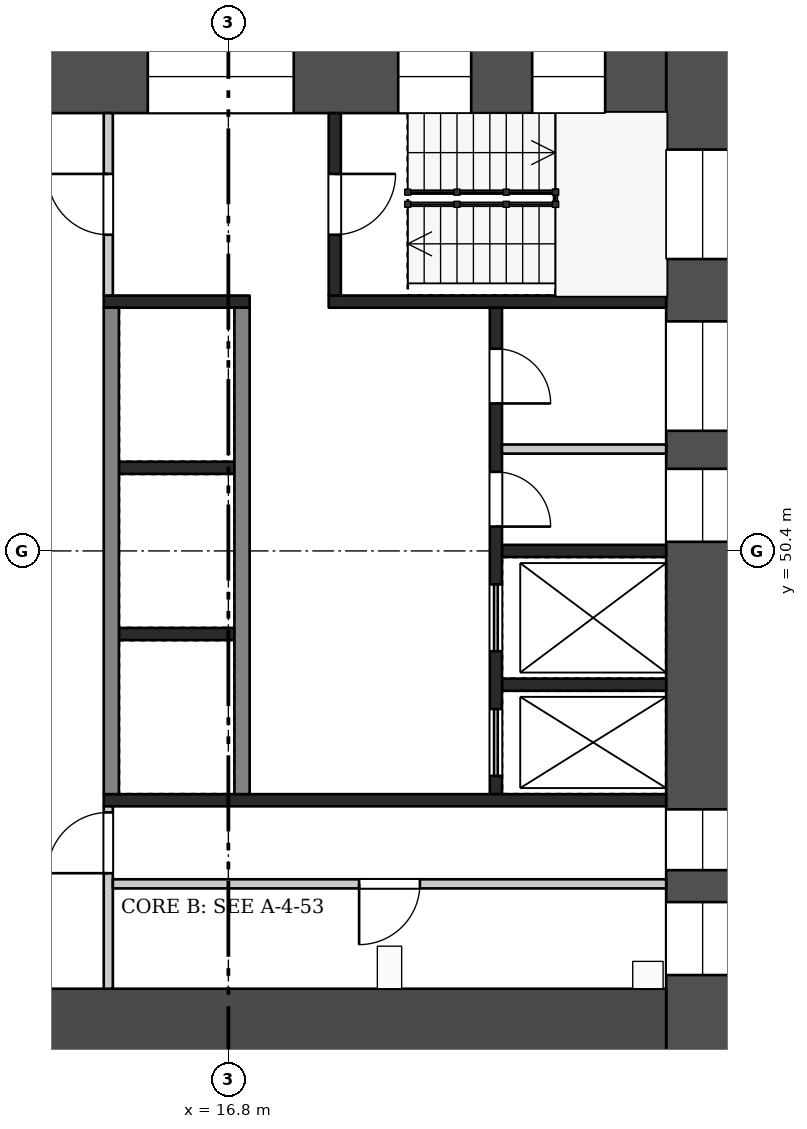
"""IFC4 building model, lengths in metres.
Left out: names, types, materials, properties, quantities, classifications, styles, units other than length and angle.
Written with IfcOpenShell. Run it as: python <this file> out.ifc"""

import sys

from ifc_helpers import new_model, si_unit, direction, frame, frame_2d, origin, place, context, subcontext, project, spatial, rectangle, extrude, element, fill, save


model = new_model("IFC4")
c1 = context("Model", 3, precision=1e-05, world=origin(), true_north=direction((0.0, 1.0)))
c2 = subcontext(c1, "Body", "Model", "MODEL_VIEW")
j1 = project(units=[si_unit("LENGTHUNIT", "METRE"), si_unit("PLANEANGLEUNIT", "RADIAN")], contexts=[c1])
p1 = place(None, origin())
s1 = spatial("IfcSite", under=j1, at=p1, CompositionType="ELEMENT")
p2 = place(p1, origin())
s2 = spatial("IfcBuilding", under=s1, at=p2, CompositionType="ELEMENT")
p3 = place(p2, frame((0.0, 0.0, 102.2)))
s3 = spatial("IfcBuildingStorey", under=s2, at=p3, CompositionType="ELEMENT", Elevation=102.2)
p4 = place(p3, frame((24.6, 58.8, 0.0), z_axis=(0.0, 0.0, 1.0), x_axis=(0.0, -1.0, 0.0)))
e1 = element("IfcWall", 1, at=p4, inside=s3, PredefinedType="SHEAR", context=c2, shape_type="SweptSolid", body=[
    extrude(rectangle(XDim=16.8, YDim=1.2, at=frame_2d((8.4, 0.0))), origin(), (0.0, 0.0, 1.0), 3.22),
])
p5 = place(p4, frame((1.8, 0.0, 0.5)))
e2 = element("IfcOpeningElement", 2, at=p5, cuts=e1, PredefinedType="OPENING", context=c2, shape_type="SweptSolid", body=[
    extrude(rectangle(XDim=1.8, YDim=2.4, at=frame_2d((0.9, 1.2))), frame((0.0, 0.61, 0.0), z_axis=(0.0, -1.0, 0.0), x_axis=(1.0, 0.0, 0.0)), (0.0, 0.0, 1.0), 1.22),
])
p6 = place(p4, frame((4.625, 0.0, 1.6)))
e3 = element("IfcOpeningElement", 3, at=p6, cuts=e1, PredefinedType="OPENING", context=c2, shape_type="SweptSolid", body=[
    extrude(rectangle(XDim=1.8, YDim=1.2, at=frame_2d((0.9, 0.6))), frame((0.0, 0.61, 0.0), z_axis=(0.0, -1.0, 0.0), x_axis=(1.0, 0.0, 0.0)), (0.0, 0.0, 1.0), 1.22),
])
p7 = place(p4, frame((7.05, 0.0, 1.6)))
e4 = element("IfcOpeningElement", 4, at=p7, cuts=e1, PredefinedType="OPENING", context=c2, shape_type="SweptSolid", body=[
    extrude(rectangle(XDim=1.2, YDim=1.2, at=frame_2d((0.6, 0.6))), frame((0.0, 0.61, 0.0), z_axis=(0.0, -1.0, 0.0), x_axis=(1.0, 0.0, 0.0)), (0.0, 0.0, 1.0), 1.22),
])
p8 = place(p4, frame((12.65, 0.0, 0.6)))
e5 = element("IfcOpeningElement", 5, at=p8, cuts=e1, PredefinedType="OPENING", context=c2, shape_type="SweptSolid", body=[
    extrude(rectangle(XDim=1.0, YDim=2.1, at=frame_2d((0.5, 1.05))), frame((0.0, 0.61, 0.0), z_axis=(0.0, -1.0, 0.0), x_axis=(1.0, 0.0, 0.0)), (0.0, 0.0, 1.0), 1.22),
])
p9 = place(p4, frame((14.175, 0.0, 1.6)))
e6 = element("IfcOpeningElement", 6, at=p9, cuts=e1, PredefinedType="OPENING", context=c2, shape_type="SweptSolid", body=[
    extrude(rectangle(XDim=1.2, YDim=1.2, at=frame_2d((0.6, 0.6))), frame((0.0, 0.61, 0.0), z_axis=(0.0, -1.0, 0.0), x_axis=(1.0, 0.0, 0.0)), (0.0, 0.0, 1.0), 1.22),
])
p10 = place(p3, frame((9.6, 58.2, 0.0), z_axis=(0.0, 0.0, 1.0), x_axis=(1.0, 0.0, 0.0)))
e7 = element("IfcWall", 7, at=p10, inside=s3, PredefinedType="SHEAR", context=c2, shape_type="SweptSolid", body=[
    extrude(rectangle(XDim=14.4, YDim=1.2, at=frame_2d((7.2, 0.0))), origin(), (0.0, 0.0, 1.0), 3.22),
])
p11 = place(p10, frame((1.105, 0.0, 0.6)))
e8 = element("IfcOpeningElement", 8, at=p11, cuts=e7, PredefinedType="OPENING", context=c2, shape_type="SweptSolid", body=[
    extrude(rectangle(XDim=3.0, YDim=2.1, at=frame_2d((1.5, 1.05))), frame((0.0, 0.61, 0.0), z_axis=(0.0, -1.0, 0.0), x_axis=(1.0, 0.0, 0.0)), (0.0, 0.0, 1.0), 1.22),
])
p12 = place(p10, frame((5.875, 0.0, 0.6)))
e9 = element("IfcOpeningElement", 9, at=p12, cuts=e7, PredefinedType="OPENING", context=c2, shape_type="SweptSolid", body=[
    extrude(rectangle(XDim=2.4, YDim=2.1, at=frame_2d((1.2, 1.05))), frame((0.0, 0.61, 0.0), z_axis=(0.0, -1.0, 0.0), x_axis=(1.0, 0.0, 0.0)), (0.0, 0.0, 1.0), 1.22),
])
p13 = place(p10, frame((9.993, 0.0, 0.5)))
e10 = element("IfcOpeningElement", 10, at=p13, cuts=e7, PredefinedType="OPENING", context=c2, shape_type="SweptSolid", body=[
    extrude(rectangle(XDim=1.2, YDim=2.4, at=frame_2d((0.6, 1.2))), frame((0.0, 0.61, 0.0), z_axis=(0.0, -1.0, 0.0), x_axis=(1.0, 0.0, 0.0)), (0.0, 0.0, 1.0), 1.22),
])
p14 = place(p10, frame((12.197, 0.0, 0.5)))
e11 = element("IfcOpeningElement", 11, at=p14, cuts=e7, PredefinedType="OPENING", context=c2, shape_type="SweptSolid", body=[
    extrude(rectangle(XDim=1.2, YDim=2.4, at=frame_2d((0.6, 1.2))), frame((0.0, 0.61, 0.0), z_axis=(0.0, -1.0, 0.0), x_axis=(1.0, 0.0, 0.0)), (0.0, 0.0, 1.0), 1.22),
])
p15 = place(p3, frame((9.6, 42.6, 0.0), z_axis=(0.0, 0.0, 1.0), x_axis=(1.0, 0.0, 0.0)))
e12 = element("IfcWall", 12, at=p15, inside=s3, PredefinedType="SHEAR", context=c2, shape_type="SweptSolid", body=[
    extrude(rectangle(XDim=14.4, YDim=1.2, at=frame_2d((7.2, 0.0))), origin(), (0.0, 0.0, 1.0), 3.22),
])
p16 = place(p15, frame((2.1, 0.0, 0.0)))
e13 = element("IfcOpeningElement", 13, at=p16, cuts=e12, PredefinedType="OPENING", context=c2, shape_type="SweptSolid", body=[
    extrude(rectangle(XDim=1.8, YDim=2.1, at=frame_2d((0.9, 1.05))), frame((0.0, 0.61, 0.0), z_axis=(0.0, -1.0, 0.0), x_axis=(1.0, 0.0, 0.0)), (0.0, 0.0, 1.0), 1.22),
])
for number, where, z_axis, x_axis in (
    (14, (15.0, 51.767, 0.0), (0.0, 0.0, 1.0), (1.0, 0.0, 0.0)),
    (15, (15.0, 49.033, 0.0), (0.0, 0.0, 1.0), (1.0, 0.0, 0.0)),
):
    element("IfcWall", number, at=place(p3, frame(where, z_axis=z_axis, x_axis=x_axis)), inside=s3, PredefinedType="SHEAR", context=c2, shape_type="SweptSolid", body=[
        extrude(rectangle(XDim=1.9, YDim=0.2, at=frame_2d((0.95, 0.0))), origin(), (0.0, 0.0, 1.0), 3.22),
    ])
for number, where, z_axis, x_axis in (
    (16, (14.875, 54.4, 0.0), (0.0, 0.0, 1.0), (0.0, -1.0, 0.0)),
    (17, (17.025, 54.4, 0.0), (0.0, 0.0, 1.0), (0.0, -1.0, 0.0)),
):
    element("IfcWall", number, at=place(p3, frame(where, z_axis=z_axis, x_axis=x_axis)), inside=s3, PredefinedType="SHEAR", context=c2, shape_type="SweptSolid", body=[
        extrude(rectangle(XDim=8.0, YDim=0.25, at=frame_2d((4.0, 0.0))), origin(), (0.0, 0.0, 1.0), 3.22),
    ])
for number, where, z_axis, x_axis in (
    (18, (21.3, 50.4, 0.0), (0.0, 0.0, 1.0), (1.0, 0.0, 0.0)),
    (19, (21.3, 48.2, 0.0), (0.0, 0.0, 1.0), (1.0, 0.0, 0.0)),
):
    element("IfcWall", number, at=place(p3, frame(where, z_axis=z_axis, x_axis=x_axis)), inside=s3, PredefinedType="SHEAR", context=c2, shape_type="SweptSolid", body=[
        extrude(rectangle(XDim=2.7, YDim=0.2, at=frame_2d((1.35, 0.0))), origin(), (0.0, 0.0, 1.0), 3.22),
    ])
p17 = place(p3, frame((21.3, 52.075, 0.0), z_axis=(0.0, 0.0, 1.0), x_axis=(1.0, 0.0, 0.0)))
e20 = element("IfcWall", 20, at=p17, inside=s3, PredefinedType="PARTITIONING", context=c2, shape_type="SweptSolid", body=[
    extrude(rectangle(XDim=2.7, YDim=0.15, at=frame_2d((1.35, 0.0))), origin(), (0.0, 0.0, 1.0), 3.22),
])
p18 = place(p3, frame((21.2, 54.4, 0.0), z_axis=(0.0, 0.0, 1.0), x_axis=(0.0, -1.0, 0.0)))
e21 = element("IfcWall", 21, at=p18, inside=s3, PredefinedType="SHEAR", context=c2, shape_type="SweptSolid", body=[
    extrude(rectangle(XDim=8.0, YDim=0.2, at=frame_2d((4.0, 0.0))), origin(), (0.0, 0.0, 1.0), 3.22),
])
p19 = place(p18, frame((0.675, 0.0, 0.0)))
e22 = element("IfcOpeningElement", 22, at=p19, cuts=e21, PredefinedType="OPENING", context=c2, shape_type="SweptSolid", body=[
    extrude(rectangle(XDim=0.9, YDim=2.1, at=frame_2d((0.45, 1.05))), frame((0.0, 0.11, 0.0), z_axis=(0.0, -1.0, 0.0), x_axis=(1.0, 0.0, 0.0)), (0.0, 0.0, 1.0), 0.22),
])
p20 = place(p18, frame((2.7, 0.0, 0.0)))
e23 = element("IfcOpeningElement", 23, at=p20, cuts=e21, PredefinedType="OPENING", context=c2, shape_type="SweptSolid", body=[
    extrude(rectangle(XDim=0.9, YDim=2.1, at=frame_2d((0.45, 1.05))), frame((0.0, 0.11, 0.0), z_axis=(0.0, -1.0, 0.0), x_axis=(1.0, 0.0, 0.0)), (0.0, 0.0, 1.0), 0.22),
])
p21 = place(p18, frame((4.55, 0.0, 0.0)))
e24 = element("IfcOpeningElement", 24, at=p21, cuts=e21, PredefinedType="OPENING", context=c2, shape_type="SweptSolid", body=[
    extrude(rectangle(XDim=1.1, YDim=2.1, at=frame_2d((0.55, 1.05))), frame((0.0, 0.11, 0.0), z_axis=(0.0, -1.0, 0.0), x_axis=(1.0, 0.0, 0.0)), (0.0, 0.0, 1.0), 0.22),
])
p22 = place(p18, frame((6.6, 0.0, 0.0)))
e25 = element("IfcOpeningElement", 25, at=p22, cuts=e21, PredefinedType="OPENING", context=c2, shape_type="SweptSolid", body=[
    extrude(rectangle(XDim=1.1, YDim=2.1, at=frame_2d((0.55, 1.05))), frame((0.0, 0.11, 0.0), z_axis=(0.0, -1.0, 0.0), x_axis=(1.0, 0.0, 0.0)), (0.0, 0.0, 1.0), 0.22),
])
p23 = place(p3, frame((14.75, 54.5, 0.0), z_axis=(0.0, 0.0, 1.0), x_axis=(1.0, 0.0, 0.0)))
e26 = element("IfcWall", 26, at=p23, inside=s3, PredefinedType="SHEAR", context=c2, shape_type="SweptSolid", body=[
    extrude(rectangle(XDim=2.4, YDim=0.2, at=frame_2d((1.2, 0.0))), origin(), (0.0, 0.0, 1.0), 3.22),
])
p24 = place(p3, frame((18.45, 54.5, 0.0), z_axis=(0.0, 0.0, 1.0), x_axis=(1.0, 0.0, 0.0)))
e27 = element("IfcWall", 27, at=p24, inside=s3, PredefinedType="SHEAR", context=c2, shape_type="SweptSolid", body=[
    extrude(rectangle(XDim=5.55, YDim=0.2, at=frame_2d((2.775, 0.0))), origin(), (0.0, 0.0, 1.0), 3.22),
])
p25 = place(p3, frame((14.825, 57.6, 0.0), z_axis=(0.0, 0.0, 1.0), x_axis=(0.0, -1.0, 0.0)))
e28 = element("IfcWall", 28, at=p25, inside=s3, PredefinedType="PARTITIONING", context=c2, shape_type="SweptSolid", body=[
    extrude(rectangle(XDim=3.0, YDim=0.15, at=frame_2d((1.5, 0.0))), origin(), (0.0, 0.0, 1.0), 3.22),
])
p26 = place(p25, frame((1.0, 0.0, 0.0)))
e29 = element("IfcOpeningElement", 29, at=p26, cuts=e28, PredefinedType="OPENING", context=c2, shape_type="SweptSolid", body=[
    extrude(rectangle(XDim=1.0, YDim=2.1, at=frame_2d((0.5, 1.05))), frame((0.0, 0.085, 0.0), z_axis=(0.0, -1.0, 0.0), x_axis=(1.0, 0.0, 0.0)), (0.0, 0.0, 1.0), 0.17),
])
p27 = place(p3, frame((18.55, 57.6, 0.0), z_axis=(0.0, 0.0, 1.0), x_axis=(0.0, -1.0, 0.0)))
e30 = element("IfcWall", 30, at=p27, inside=s3, PredefinedType="SHEAR", context=c2, shape_type="SweptSolid", body=[
    extrude(rectangle(XDim=3.0, YDim=0.2, at=frame_2d((1.5, 0.0))), origin(), (0.0, 0.0, 1.0), 3.22),
])
p28 = place(p27, frame((1.0, 0.0, 0.0)))
e31 = element("IfcOpeningElement", 31, at=p28, cuts=e30, PredefinedType="OPENING", context=c2, shape_type="SweptSolid", body=[
    extrude(rectangle(XDim=1.0, YDim=2.1, at=frame_2d((0.5, 1.05))), frame((0.0, 0.11, 0.0), z_axis=(0.0, -1.0, 0.0), x_axis=(1.0, 0.0, 0.0)), (0.0, 0.0, 1.0), 0.22),
])
p29 = place(p3, frame((14.75, 46.3, 0.0), z_axis=(0.0, 0.0, 1.0), x_axis=(1.0, 0.0, 0.0)))
e32 = element("IfcWall", 32, at=p29, inside=s3, PredefinedType="SHEAR", context=c2, shape_type="SweptSolid", body=[
    extrude(rectangle(XDim=9.25, YDim=0.2, at=frame_2d((4.625, 0.0))), origin(), (0.0, 0.0, 1.0), 3.22),
])
p30 = place(p3, frame((14.825, 46.2, 0.0), z_axis=(0.0, 0.0, 1.0), x_axis=(0.0, -1.0, 0.0)))
e33 = element("IfcWall", 33, at=p30, inside=s3, PredefinedType="PARTITIONING", context=c2, shape_type="SweptSolid", body=[
    extrude(rectangle(XDim=3.0, YDim=0.15, at=frame_2d((1.5, 0.0))), origin(), (0.0, 0.0, 1.0), 3.22),
])
p31 = place(p30, frame((0.1, 0.0, 0.0)))
e34 = element("IfcOpeningElement", 34, at=p31, cuts=e33, PredefinedType="OPENING", context=c2, shape_type="SweptSolid", body=[
    extrude(rectangle(XDim=1.0, YDim=2.1, at=frame_2d((0.5, 1.05))), frame((0.0, 0.085, 0.0), z_axis=(0.0, -1.0, 0.0), x_axis=(1.0, 0.0, 0.0)), (0.0, 0.0, 1.0), 0.17),
])
p32 = place(p3, frame((14.9, 44.925, 0.0), z_axis=(0.0, 0.0, 1.0), x_axis=(1.0, 0.0, 0.0)))
e35 = element("IfcWall", 35, at=p32, inside=s3, PredefinedType="PARTITIONING", context=c2, shape_type="SweptSolid", body=[
    extrude(rectangle(XDim=9.1, YDim=0.15, at=frame_2d((4.55, 0.0))), origin(), (0.0, 0.0, 1.0), 3.22),
])
p33 = place(p32, frame((4.05, 0.0, 0.0)))
e36 = element("IfcOpeningElement", 36, at=p33, cuts=e35, PredefinedType="OPENING", context=c2, shape_type="SweptSolid", body=[
    extrude(rectangle(XDim=1.0, YDim=2.1, at=frame_2d((0.5, 1.05))), frame((0.0, 0.085, 0.0), z_axis=(0.0, -1.0, 0.0), x_axis=(1.0, 0.0, 0.0)), (0.0, 0.0, 1.0), 0.17),
])
p34 = place(p19, origin())
e37 = element("IfcDoor", 37, at=p34, inside=s3, OperationType="SINGLE_SWING_RIGHT", PredefinedType="DOOR", context=c2, shape_type="SweptSolid", body=[
    extrude(rectangle(XDim=0.9, YDim=2.1, at=frame_2d((0.45, 1.05))), frame((0.0, 0.025, 0.0), z_axis=(0.0, -1.0, 0.0), x_axis=(1.0, 0.0, 0.0)), (0.0, 0.0, 1.0), 0.05),
])
fill(e22, e37)
p35 = place(p20, origin())
e38 = element("IfcDoor", 38, at=p35, inside=s3, OperationType="SINGLE_SWING_RIGHT", PredefinedType="DOOR", context=c2, shape_type="SweptSolid", body=[
    extrude(rectangle(XDim=0.9, YDim=2.1, at=frame_2d((0.45, 1.05))), frame((0.0, 0.025, 0.0), z_axis=(0.0, -1.0, 0.0), x_axis=(1.0, 0.0, 0.0)), (0.0, 0.0, 1.0), 0.05),
])
fill(e23, e38)
p36 = place(p21, origin())
e39 = element("IfcDoor", 39, at=p36, inside=s3, OperationType="DOUBLE_DOOR_SLIDING", PredefinedType="DOOR", context=c2, shape_type="SweptSolid", body=[
    extrude(rectangle(XDim=1.1, YDim=2.1, at=frame_2d((0.55, 1.05))), frame((0.0, 0.025, 0.0), z_axis=(0.0, -1.0, 0.0), x_axis=(1.0, 0.0, 0.0)), (0.0, 0.0, 1.0), 0.05),
])
fill(e24, e39)
p37 = place(p22, origin())
e40 = element("IfcDoor", 40, at=p37, inside=s3, OperationType="DOUBLE_DOOR_SLIDING", PredefinedType="DOOR", context=c2, shape_type="SweptSolid", body=[
    extrude(rectangle(XDim=1.1, YDim=2.1, at=frame_2d((0.55, 1.05))), frame((0.0, 0.025, 0.0), z_axis=(0.0, -1.0, 0.0), x_axis=(1.0, 0.0, 0.0)), (0.0, 0.0, 1.0), 0.05),
])
fill(e25, e40)
p38 = place(p26, frame((1.0, 0.0, 0.0), z_axis=(0.0, 0.0, 1.0), x_axis=(-1.0, 0.0, 0.0)))
e41 = element("IfcDoor", 41, at=p38, inside=s3, OperationType="SINGLE_SWING_RIGHT", PredefinedType="DOOR", context=c2, shape_type="SweptSolid", body=[
    extrude(rectangle(XDim=1.0, YDim=2.1, at=frame_2d((0.5, 1.05))), frame((0.0, 0.025, 0.0), z_axis=(0.0, -1.0, 0.0), x_axis=(1.0, 0.0, 0.0)), (0.0, 0.0, 1.0), 0.05),
])
fill(e29, e41)
p39 = place(p28, origin())
e42 = element("IfcDoor", 42, at=p39, inside=s3, OperationType="SINGLE_SWING_LEFT", PredefinedType="DOOR", context=c2, shape_type="SweptSolid", body=[
    extrude(rectangle(XDim=1.0, YDim=2.1, at=frame_2d((0.5, 1.05))), frame((0.0, 0.025, 0.0), z_axis=(0.0, -1.0, 0.0), x_axis=(1.0, 0.0, 0.0)), (0.0, 0.0, 1.0), 0.05),
])
fill(e31, e42)
p40 = place(p31, frame((1.0, 0.0, 0.0), z_axis=(0.0, 0.0, 1.0), x_axis=(-1.0, 0.0, 0.0)))
e43 = element("IfcDoor", 43, at=p40, inside=s3, OperationType="SINGLE_SWING_LEFT", PredefinedType="DOOR", context=c2, shape_type="SweptSolid", body=[
    extrude(rectangle(XDim=1.0, YDim=2.1, at=frame_2d((0.5, 1.05))), frame((0.0, 0.025, 0.0), z_axis=(0.0, -1.0, 0.0), x_axis=(1.0, 0.0, 0.0)), (0.0, 0.0, 1.0), 0.05),
])
fill(e34, e43)
p41 = place(p33, frame((1.0, 0.0, 0.0), z_axis=(0.0, 0.0, 1.0), x_axis=(-1.0, 0.0, 0.0)))
e44 = element("IfcDoor", 44, at=p41, inside=s3, OperationType="SINGLE_SWING_RIGHT", PredefinedType="DOOR", context=c2, shape_type="SweptSolid", body=[
    extrude(rectangle(XDim=1.0, YDim=2.1, at=frame_2d((0.5, 1.05))), frame((0.0, 0.025, 0.0), z_axis=(0.0, -1.0, 0.0), x_axis=(1.0, 0.0, 0.0)), (0.0, 0.0, 1.0), 0.05),
])
fill(e36, e44)
p42 = place(p5, origin())
e45 = element("IfcWindow", 45, at=p42, inside=s3, PartitioningType="SINGLE_PANEL", PredefinedType="WINDOW", context=c2, shape_type="SweptSolid", body=[
    extrude(rectangle(XDim=1.8, YDim=2.4, at=frame_2d((0.9, 1.2))), frame((0.0, 0.03, 0.0), z_axis=(0.0, -1.0, 0.0), x_axis=(1.0, 0.0, 0.0)), (0.0, 0.0, 1.0), 0.06),
])
fill(e2, e45)
p43 = place(p6, origin())
e46 = element("IfcWindow", 46, at=p43, inside=s3, PartitioningType="SINGLE_PANEL", PredefinedType="WINDOW", context=c2, shape_type="SweptSolid", body=[
    extrude(rectangle(XDim=1.8, YDim=1.2, at=frame_2d((0.9, 0.6))), frame((0.0, 0.03, 0.0), z_axis=(0.0, -1.0, 0.0), x_axis=(1.0, 0.0, 0.0)), (0.0, 0.0, 1.0), 0.06),
])
fill(e3, e46)
p44 = place(p7, origin())
e47 = element("IfcWindow", 47, at=p44, inside=s3, PartitioningType="SINGLE_PANEL", PredefinedType="WINDOW", context=c2, shape_type="SweptSolid", body=[
    extrude(rectangle(XDim=1.2, YDim=1.2, at=frame_2d((0.6, 0.6))), frame((0.0, 0.03, 0.0), z_axis=(0.0, -1.0, 0.0), x_axis=(1.0, 0.0, 0.0)), (0.0, 0.0, 1.0), 0.06),
])
fill(e4, e47)
p45 = place(p8, origin())
e48 = element("IfcWindow", 48, at=p45, inside=s3, PartitioningType="SINGLE_PANEL", PredefinedType="WINDOW", context=c2, shape_type="SweptSolid", body=[
    extrude(rectangle(XDim=1.0, YDim=2.1, at=frame_2d((0.5, 1.05))), frame((0.0, 0.03, 0.0), z_axis=(0.0, -1.0, 0.0), x_axis=(1.0, 0.0, 0.0)), (0.0, 0.0, 1.0), 0.06),
])
fill(e5, e48)
p46 = place(p9, origin())
e49 = element("IfcWindow", 49, at=p46, inside=s3, PartitioningType="SINGLE_PANEL", PredefinedType="WINDOW", context=c2, shape_type="SweptSolid", body=[
    extrude(rectangle(XDim=1.2, YDim=1.2, at=frame_2d((0.6, 0.6))), frame((0.0, 0.03, 0.0), z_axis=(0.0, -1.0, 0.0), x_axis=(1.0, 0.0, 0.0)), (0.0, 0.0, 1.0), 0.06),
])
fill(e6, e49)
p47 = place(p12, origin())
e50 = element("IfcWindow", 50, at=p47, inside=s3, PartitioningType="SINGLE_PANEL", PredefinedType="WINDOW", context=c2, shape_type="SweptSolid", body=[
    extrude(rectangle(XDim=2.4, YDim=2.1, at=frame_2d((1.2, 1.05))), frame((0.0, 0.03, 0.0), z_axis=(0.0, -1.0, 0.0), x_axis=(1.0, 0.0, 0.0)), (0.0, 0.0, 1.0), 0.06),
])
fill(e9, e50)
p48 = place(p13, origin())
e51 = element("IfcWindow", 51, at=p48, inside=s3, PartitioningType="SINGLE_PANEL", PredefinedType="WINDOW", context=c2, shape_type="SweptSolid", body=[
    extrude(rectangle(XDim=1.2, YDim=2.4, at=frame_2d((0.6, 1.2))), frame((0.0, 0.03, 0.0), z_axis=(0.0, -1.0, 0.0), x_axis=(1.0, 0.0, 0.0)), (0.0, 0.0, 1.0), 0.06),
])
fill(e10, e51)
p49 = place(p14, origin())
e52 = element("IfcWindow", 52, at=p49, inside=s3, PartitioningType="SINGLE_PANEL", PredefinedType="WINDOW", context=c2, shape_type="SweptSolid", body=[
    extrude(rectangle(XDim=1.2, YDim=2.4, at=frame_2d((0.6, 1.2))), frame((0.0, 0.03, 0.0), z_axis=(0.0, -1.0, 0.0), x_axis=(1.0, 0.0, 0.0)), (0.0, 0.0, 1.0), 0.06),
])
fill(e11, e52)
save(model, sys.argv[1])
